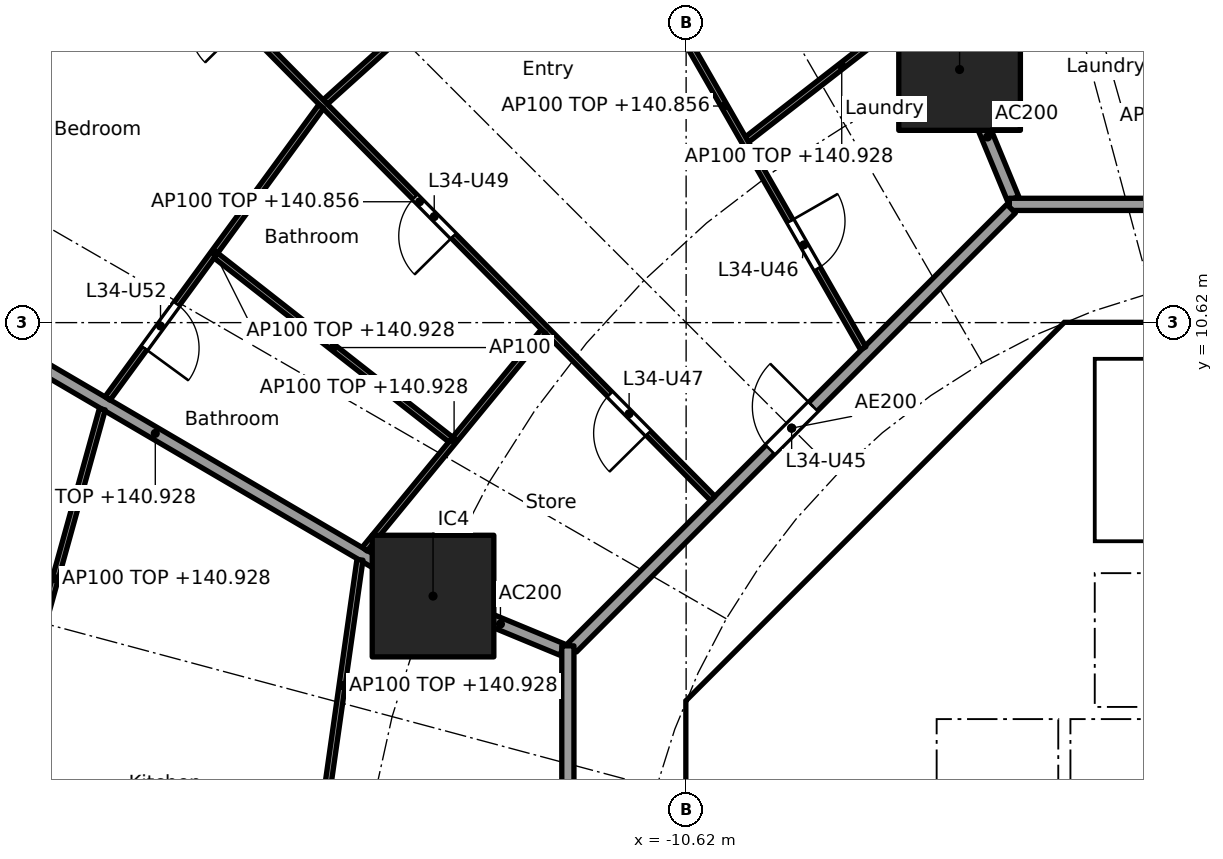
"""IFC4 building model, lengths in metres.
Left out: names, types, materials, properties, quantities, classifications, styles, units other than length and angle.
Written with IfcOpenShell. Run it as: python <this file> out.ifc"""

import sys

from ifc_helpers import new_model, si_unit, direction, frame, frame_2d, origin, origin_2d, place, context, subcontext, project, spatial, polyline, rectangle, outline, extrude, element, fill, save


model = new_model("IFC4")
c1 = context("Model", 3, precision=1e-05, world=origin(), true_north=direction((0.0, 1.0)))
c2 = subcontext(c1, "Body", "Model", "MODEL_VIEW")
j1 = project(units=[si_unit("LENGTHUNIT", "METRE"), si_unit("PLANEANGLEUNIT", "RADIAN")], contexts=[c1])
p1 = place(None, origin())
s1 = spatial("IfcSite", under=j1, at=p1, CompositionType="ELEMENT")
p2 = place(p1, origin())
s2 = spatial("IfcBuilding", under=s1, at=p2, CompositionType="ELEMENT")
p3 = place(p2, frame((0.0, 0.0, 138.1)))
s3 = spatial("IfcBuildingStorey", under=s2, at=p3, CompositionType="ELEMENT", Elevation=138.1)
for number, where, z_axis, x_axis in (
    (1, (-6.123, 14.782, 0.0), (0.0, 0.0, 1.0), (1.0, 0.0, 0.0)),
    (2, (-14.782, 6.123, 0.0), (0.0, 0.0, 1.0), (1.0, 0.0, 0.0)),
):
    element("IfcColumn", number, at=place(p3, frame(where, z_axis=z_axis, x_axis=x_axis)), inside=s3, PredefinedType="COLUMN", context=c2, shape_type="SweptSolid", body=[
        extrude(rectangle(XDim=2.0, YDim=2.0, at=origin_2d()), origin(), (0.0, 0.0, 1.0), 3.7),
    ])
p4 = place(p3, frame((-4.613, 9.988, 0.0), z_axis=(0.0, 0.0, 1.0), x_axis=(-0.707106781187, -0.707106781187, 0.0)))
e3 = element("IfcWall", 3, at=p4, inside=s3, PredefinedType="SHEAR", context=c2, shape_type="SweptSolid", body=[
    extrude(rectangle(XDim=7.602, YDim=0.6, at=frame_2d((3.801, 0.0))), origin(), (0.0, 0.0, 1.0), 3.44),
])
p5 = place(p4, frame((0.351, 0.0, 0.0)))
e4 = element("IfcOpeningElement", 4, at=p5, cuts=e3, PredefinedType="OPENING", context=c2, shape_type="SweptSolid", body=[
    extrude(rectangle(XDim=1.1, YDim=2.1, at=frame_2d((0.55, 1.05))), frame((0.0, 0.31, 0.0), z_axis=(0.0, -1.0, 0.0), x_axis=(1.0, 0.0, 0.0)), (0.0, 0.0, 1.0), 0.62),
])
p6 = place(p3, frame((-10.325, 3.801, 0.0), z_axis=(0.0, 0.0, 1.0), x_axis=(0.0, -1.0, 0.0)))
e5 = element("IfcWall", 5, at=p6, inside=s3, PredefinedType="SHEAR", context=c2, shape_type="SweptSolid", body=[
    extrude(rectangle(XDim=7.602, YDim=0.6, at=frame_2d((3.801, 0.0))), origin(), (0.0, 0.0, 1.0), 3.44),
])
p7 = place(p6, frame((0.651, 0.0, 0.0)))
e6 = element("IfcOpeningElement", 6, at=p7, cuts=e5, PredefinedType="OPENING", context=c2, shape_type="SweptSolid", body=[
    extrude(rectangle(XDim=1.5, YDim=2.1, at=frame_2d((0.75, 1.05))), frame((0.0, 0.31, 0.0), z_axis=(0.0, -1.0, 0.0), x_axis=(1.0, 0.0, 0.0)), (0.0, 0.0, 1.0), 0.62),
])
p8 = place(p6, frame((5.451, 0.0, 0.0)))
e7 = element("IfcOpeningElement", 7, at=p8, cuts=e5, PredefinedType="OPENING", context=c2, shape_type="SweptSolid", body=[
    extrude(rectangle(XDim=1.5, YDim=2.1, at=frame_2d((0.75, 1.05))), frame((0.0, 0.31, 0.0), z_axis=(0.0, -1.0, 0.0), x_axis=(1.0, 0.0, 0.0)), (0.0, 0.0, 1.0), 0.62),
])
p9 = place(p3, frame((-5.8, 4.3, 0.0), z_axis=(0.0, 0.0, 1.0), x_axis=(0.0, 1.0, 0.0)))
e8 = element("IfcWall", 8, at=p9, inside=s3, PredefinedType="PARTITIONING", context=c2, shape_type="SweptSolid", body=[
    extrude(rectangle(XDim=3.927, YDim=0.15, at=frame_2d((1.963, 0.0))), origin(), (0.0, 0.0, 1.0), 3.44),
])
p10 = place(p9, frame((0.413, 0.0, 0.0)))
e9 = element("IfcOpeningElement", 9, at=p10, cuts=e8, PredefinedType="OPENING", context=c2, shape_type="SweptSolid", body=[
    extrude(rectangle(XDim=0.9, YDim=2.1, at=frame_2d((0.45, 1.05))), frame((0.0, 0.085, 0.0), z_axis=(0.0, -1.0, 0.0), x_axis=(1.0, 0.0, 0.0)), (0.0, 0.0, 1.0), 0.17),
])
p11 = place(p9, frame((2.489, 0.0, 0.0)))
e10 = element("IfcOpeningElement", 10, at=p11, cuts=e8, PredefinedType="OPENING", context=c2, shape_type="SweptSolid", body=[
    extrude(rectangle(XDim=0.9, YDim=2.1, at=frame_2d((0.45, 1.05))), frame((0.0, 0.085, 0.0), z_axis=(0.0, -1.0, 0.0), x_axis=(1.0, 0.0, 0.0)), (0.0, 0.0, 1.0), 0.17),
])
p12 = place(p3, frame((-4.0, 4.3, 0.0), z_axis=(0.0, 0.0, 1.0), x_axis=(0.0, 1.0, 0.0)))
e11 = element("IfcWall", 11, at=p12, inside=s3, PredefinedType="SOLIDWALL", context=c2, shape_type="SweptSolid", body=[
    extrude(rectangle(XDim=2.2, YDim=0.2, at=frame_2d((1.1, 0.0))), origin(), (0.0, 0.0, 1.0), 3.44),
])
p13 = place(p12, frame((0.55, 0.0, 0.0)))
e12 = element("IfcOpeningElement", 12, at=p13, cuts=e11, PredefinedType="OPENING", context=c2, shape_type="SweptSolid", body=[
    extrude(rectangle(XDim=1.1, YDim=2.1, at=frame_2d((0.55, 1.05))), frame((0.0, 0.11, 0.0), z_axis=(0.0, -1.0, 0.0), x_axis=(1.0, 0.0, 0.0)), (0.0, 0.0, 1.0), 0.22),
])
p14 = place(p3, origin())
e13 = element("IfcWall", 13, at=p14, inside=s3, PredefinedType="SHEAR", context=c2, shape_type="SweptSolid", body=[
    extrude(outline(polyline([(-10.2, 4.825), (-9.776, 4.401), (-10.025, 4.152), (-10.025, 3.801), (-10.625, 3.801), (-10.625, 4.401), (-10.2, 4.825)])), origin(), (0.0, 0.0, 1.0), 3.44),
])
p15 = place(p3, origin())
e14 = element("IfcWall", 14, at=p15, inside=s3, PredefinedType="SHEAR", context=c2, shape_type="SweptSolid", body=[
    extrude(outline(polyline([(-4.152, 10.025), (-4.401, 9.776), (-4.825, 10.2), (-4.401, 10.625), (4.401, 10.625), (4.825, 10.2), (4.401, 9.776), (4.152, 10.025), (-4.152, 10.025)])), origin(), (0.0, 0.0, 1.0), 3.44),
])
p16 = place(p3, frame((-10.025, 4.0, 0.0), z_axis=(0.0, 0.0, 1.0), x_axis=(1.0, 0.0, 0.0)))
e15 = element("IfcWall", 15, at=p16, inside=s3, PredefinedType="PARTITIONING", context=c2, shape_type="SweptSolid", body=[
    extrude(rectangle(XDim=3.325, YDim=0.2, at=frame_2d((1.662, 0.0))), origin(), (0.0, 0.0, 1.0), 3.44),
])
p17 = place(p3, frame((-8.001, 6.1, 0.0), z_axis=(0.0, 0.0, 1.0), x_axis=(1.0, 0.0, 0.0)))
e16 = element("IfcWall", 16, at=p17, inside=s3, PredefinedType="PARTITIONING", context=c2, shape_type="SweptSolid", body=[
    extrude(rectangle(XDim=2.126, YDim=0.15, at=frame_2d((1.063, 0.0))), origin(), (0.0, 0.0, 1.0), 3.44),
])
p18 = place(p3, origin())
e17 = element("IfcWall", 17, at=p18, inside=s3, PredefinedType="SOLIDWALL", context=c2, shape_type="SweptSolid", body=[
    extrude(outline(polyline([(-6.5, 2.1), (-6.7, 2.1), (-6.7, 4.3), (6.7, 4.3), (6.7, 2.1), (6.5, 2.1), (6.5, 4.1), (4.5, 4.1), (4.5, 2.1), (4.3, 2.1), (4.3, 4.1), (2.3, 4.1), (2.3, 2.1), (2.1, 2.1), (2.1, 4.1), (0.1, 4.1), (0.1, 2.1), (-0.1, 2.1), (-0.1, 4.1), (-2.1, 4.1), (-2.1, 2.1), (-2.3, 2.1), (-2.3, 4.1), (-4.3, 4.1), (-4.3, 2.1), (-4.5, 2.1), (-4.5, 4.1), (-6.5, 4.1), (-6.5, 2.1)])), origin(), (0.0, 0.0, 1.0), 3.44),
])
p19 = place(p3, origin())
e18 = element("IfcWall", 18, at=p19, inside=s3, PredefinedType="SOLIDWALL", context=c2, shape_type="SweptSolid", body=[
    extrude(outline(polyline([(-3.9, 7.025), (-4.1, 7.025), (-4.1, 10.025), (-3.9, 10.025), (-3.9, 7.025)])), origin(), (0.0, 0.0, 1.0), 3.44),
])
p20 = place(p3, origin())
e19 = element("IfcWall", 19, at=p20, inside=s3, PredefinedType="SOLIDWALL", context=c2, shape_type="SweptSolid", body=[
    extrude(outline(polyline([(4.1, 6.5), (-4.1, 6.5), (-4.1, 7.025), (4.1, 7.025), (4.1, 6.5)])), origin(), (0.0, 0.0, 1.0), 3.44),
])
p21 = place(p3, frame((-5.243, 12.657, 0.0), z_axis=(0.0, 0.0, 1.0), x_axis=(-0.38273085373, 0.923859888513, 0.0)))
e20 = element("IfcWall", 20, at=p21, inside=s3, PredefinedType="PARTITIONING", context=c2, shape_type="SweptSolid", body=[
    extrude(rectangle(XDim=2.199, YDim=0.2, at=frame_2d((1.1, 0.0))), origin(), (0.0, 0.0, 1.0), 3.44),
])
p22 = place(p3, frame((-6.134, 14.831, 0.0), z_axis=(0.0, 0.0, 1.0), x_axis=(-0.220337590808, 0.975423675167, 0.0)))
e21 = element("IfcWall", 21, at=p22, inside=s3, PredefinedType="PARTITIONING", context=c2, shape_type="SweptSolid", body=[
    extrude(rectangle(XDim=10.451, YDim=0.2, at=frame_2d((5.226, 0.0))), origin(), (0.0, 0.0, 1.0), 2.828),
])
p23 = place(p3, frame((-12.657, 5.243, 0.0), z_axis=(0.0, 0.0, 1.0), x_axis=(-0.923869415315, 0.382707856524, 0.0)))
e22 = element("IfcWall", 22, at=p23, inside=s3, PredefinedType="PARTITIONING", context=c2, shape_type="SweptSolid", body=[
    extrude(rectangle(XDim=2.2, YDim=0.2, at=frame_2d((1.1, 0.0))), origin(), (0.0, 0.0, 1.0), 3.44),
])
p24 = place(p3, frame((-14.825, 6.148, 0.0), z_axis=(0.0, 0.0, 1.0), x_axis=(-0.862852031662, 0.505456597006, 0.0)))
e23 = element("IfcWall", 23, at=p24, inside=s3, PredefinedType="PARTITIONING", context=c2, shape_type="SweptSolid", body=[
    extrude(rectangle(XDim=10.487, YDim=0.2, at=frame_2d((5.244, 0.0))), origin(), (0.0, 0.0, 1.0), 2.828),
])
p25 = place(p3, frame((5.104, 12.565, 0.0), z_axis=(0.0, 0.0, 1.0), x_axis=(-1.0, 0.0, 0.0)))
e24 = element("IfcWall", 24, at=p25, inside=s3, PredefinedType="PARTITIONING", context=c2, shape_type="SweptSolid", body=[
    extrude(rectangle(XDim=10.409, YDim=0.2, at=frame_2d((5.205, 0.0))), origin(), (0.0, 0.0, 1.0), 3.44),
])
p26 = place(p3, frame((-5.275, 12.494, 0.0), z_axis=(0.0, 0.0, 1.0), x_axis=(-0.707106781187, -0.707106781187, 0.0)))
e25 = element("IfcWall", 25, at=p26, inside=s3, PredefinedType="PARTITIONING", context=c2, shape_type="SweptSolid", body=[
    extrude(rectangle(XDim=10.209, YDim=0.2, at=frame_2d((5.104, 0.0))), origin(), (0.0, 0.0, 1.0), 3.44),
])
p27 = place(p26, frame((4.604, 0.0, 0.0)))
e26 = element("IfcOpeningElement", 26, at=p27, cuts=e25, PredefinedType="OPENING", context=c2, shape_type="SweptSolid", body=[
    extrude(rectangle(XDim=1.0, YDim=2.1, at=frame_2d((0.5, 1.05))), frame((0.0, 0.11, 0.0), z_axis=(0.0, -1.0, 0.0), x_axis=(1.0, 0.0, 0.0)), (0.0, 0.0, 1.0), 0.22),
])
p28 = place(p3, frame((-12.565, 5.304, 0.0), z_axis=(0.0, 0.0, 1.0), x_axis=(0.0, -1.0, 0.0)))
e27 = element("IfcWall", 27, at=p28, inside=s3, PredefinedType="PARTITIONING", context=c2, shape_type="SweptSolid", body=[
    extrude(rectangle(XDim=10.409, YDim=0.2, at=frame_2d((5.205, 0.0))), origin(), (0.0, 0.0, 1.0), 3.44),
])
p29 = place(p3, frame((-6.503, 16.054, 0.0), z_axis=(0.0, 0.0, 1.0), x_axis=(-0.789428807693, -0.613842127574, 0.0)))
e28 = element("IfcWall", 28, at=p29, inside=s3, PredefinedType="PARTITIONING", context=c2, shape_type="SweptSolid", body=[
    extrude(rectangle(XDim=3.948, YDim=0.1, at=frame_2d((1.974, 0.0))), origin(), (0.0, 0.0, 1.0), 2.828),
])
p30 = place(p3, frame((-7.708, 10.198, 0.0), z_axis=(0.0, 0.0, 1.0), x_axis=(-0.497449462689, 0.867492957937, 0.0)))
e29 = element("IfcWall", 29, at=p30, inside=s3, PredefinedType="PARTITIONING", context=c2, shape_type="SweptSolid", body=[
    extrude(rectangle(XDim=9.185, YDim=0.1, at=frame_2d((4.592, 0.0))), origin(), (0.0, 0.0, 1.0), 2.756),
])
p31 = place(p30, frame((1.511, 0.0, 0.0)))
e30 = element("IfcOpeningElement", 30, at=p31, cuts=e29, PredefinedType="OPENING", context=c2, shape_type="SweptSolid", body=[
    extrude(rectangle(XDim=0.9, YDim=2.1, at=frame_2d((0.45, 1.05))), frame((0.0, 0.06, 0.0), z_axis=(0.0, -1.0, 0.0), x_axis=(1.0, 0.0, 0.0)), (0.0, 0.0, 1.0), 0.12),
])
p32 = place(p30, frame((6.078, 0.0, 0.0)))
e31 = element("IfcOpeningElement", 31, at=p32, cuts=e29, PredefinedType="OPENING", context=c2, shape_type="SweptSolid", body=[
    extrude(rectangle(XDim=0.9, YDim=2.1, at=frame_2d((0.45, 1.05))), frame((0.0, 0.06, 0.0), z_axis=(0.0, -1.0, 0.0), x_axis=(1.0, 0.0, 0.0)), (0.0, 0.0, 1.0), 0.12),
])
p33 = place(p3, frame((-12.289, 18.089, 0.0), z_axis=(0.0, 0.0, 1.0), x_axis=(-0.743146066164, -0.669129228435, 0.0)))
e32 = element("IfcWall", 32, at=p33, inside=s3, PredefinedType="PARTITIONING", context=c2, shape_type="SweptSolid", body=[
    extrude(rectangle(XDim=5.739, YDim=0.1, at=frame_2d((2.87, 0.0))), origin(), (0.0, 0.0, 1.0), 2.828),
])
p34 = place(p33, frame((2.42, 0.0, 0.0)))
e33 = element("IfcOpeningElement", 33, at=p34, cuts=e32, PredefinedType="OPENING", context=c2, shape_type="SweptSolid", body=[
    extrude(rectangle(XDim=0.9, YDim=2.1, at=frame_2d((0.45, 1.05))), frame((0.0, 0.06, 0.0), z_axis=(0.0, -1.0, 0.0), x_axis=(1.0, 0.0, 0.0)), (0.0, 0.0, 1.0), 0.12),
])
p35 = place(p3, frame((-10.182, 7.729, 0.0), z_axis=(0.0, 0.0, 1.0), x_axis=(-0.702930219229, 0.7112588185, 0.0)))
e34 = element("IfcWall", 34, at=p35, inside=s3, PredefinedType="PARTITIONING", context=c2, shape_type="SweptSolid", body=[
    extrude(rectangle(XDim=13.719, YDim=0.1, at=frame_2d((6.859, 0.0))), origin(), (0.0, 0.0, 1.0), 2.756),
])
p36 = place(p35, frame((1.507, 0.0, 0.0)))
e35 = element("IfcOpeningElement", 35, at=p36, cuts=e34, PredefinedType="OPENING", context=c2, shape_type="SweptSolid", body=[
    extrude(rectangle(XDim=0.9, YDim=2.1, at=frame_2d((0.45, 1.05))), frame((0.0, 0.06, 0.0), z_axis=(0.0, -1.0, 0.0), x_axis=(1.0, 0.0, 0.0)), (0.0, 0.0, 1.0), 0.12),
])
p37 = place(p35, frame((6.067, 0.0, 0.0)))
e36 = element("IfcOpeningElement", 36, at=p37, cuts=e34, PredefinedType="OPENING", context=c2, shape_type="SweptSolid", body=[
    extrude(rectangle(XDim=0.9, YDim=2.1, at=frame_2d((0.45, 1.05))), frame((0.0, 0.06, 0.0), z_axis=(0.0, -1.0, 0.0), x_axis=(1.0, 0.0, 0.0)), (0.0, 0.0, 1.0), 0.12),
])
p38 = place(p35, frame((10.969, 0.0, 0.0)))
e37 = element("IfcOpeningElement", 37, at=p38, cuts=e34, PredefinedType="OPENING", context=c2, shape_type="SweptSolid", body=[
    extrude(rectangle(XDim=0.9, YDim=2.1, at=frame_2d((0.45, 1.05))), frame((0.0, 0.06, 0.0), z_axis=(0.0, -1.0, 0.0), x_axis=(1.0, 0.0, 0.0)), (0.0, 0.0, 1.0), 0.12),
])
p39 = place(p3, frame((-12.965, 10.475, 0.0), z_axis=(0.0, 0.0, 1.0), x_axis=(-0.634943961338, -0.772558195841, 0.0)))
e38 = element("IfcWall", 38, at=p39, inside=s3, PredefinedType="PARTITIONING", context=c2, shape_type="SweptSolid", body=[
    extrude(rectangle(XDim=4.632, YDim=0.1, at=frame_2d((2.316, 0.0))), origin(), (0.0, 0.0, 1.0), 2.828),
])
p40 = place(p3, frame((-16.621, 14.174, 0.0), z_axis=(0.0, 0.0, 1.0), x_axis=(-0.590674917338, -0.806909624449, 0.0)))
e39 = element("IfcWall", 39, at=p40, inside=s3, PredefinedType="PARTITIONING", context=c2, shape_type="SweptSolid", body=[
    extrude(rectangle(XDim=5.949, YDim=0.1, at=frame_2d((2.975, 0.0))), origin(), (0.0, 0.0, 1.0), 2.828),
])
p41 = place(p40, frame((4.024, 0.0, 0.0)))
e40 = element("IfcOpeningElement", 40, at=p41, cuts=e39, PredefinedType="OPENING", context=c2, shape_type="SweptSolid", body=[
    extrude(rectangle(XDim=0.9, YDim=2.1, at=frame_2d((0.45, 1.05))), frame((0.0, 0.06, 0.0), z_axis=(0.0, -1.0, 0.0), x_axis=(1.0, 0.0, 0.0)), (0.0, 0.0, 1.0), 0.12),
])
p42 = place(p3, frame((-14.491, 8.697, 0.0), z_axis=(0.0, 0.0, 1.0), x_axis=(-0.787139479951, 0.616775031193, 0.0)))
e41 = element("IfcWall", 41, at=p42, inside=s3, PredefinedType="PARTITIONING", context=c2, shape_type="SweptSolid", body=[
    extrude(rectangle(XDim=4.907, YDim=0.1, at=frame_2d((2.453, 0.0))), origin(), (0.0, 0.0, 1.0), 3.44),
])
p43 = place(p3, frame((-15.984, 6.72, 0.0), z_axis=(0.0, 0.0, 1.0), x_axis=(-0.140684869512, -0.990054426529, 0.0)))
e42 = element("IfcWall", 42, at=p43, inside=s3, PredefinedType="PARTITIONING", context=c2, shape_type="SweptSolid", body=[
    extrude(rectangle(XDim=4.177, YDim=0.1, at=frame_2d((2.088, 0.0))), origin(), (0.0, 0.0, 1.0), 2.828),
])
p44 = place(p3, frame((-20.221, 9.197, 0.0), z_axis=(0.0, 0.0, 1.0), x_axis=(-0.267398009191, -0.963586168789, 0.0)))
e43 = element("IfcWall", 43, at=p44, inside=s3, PredefinedType="PARTITIONING", context=c2, shape_type="SweptSolid", body=[
    extrude(rectangle(XDim=5.788, YDim=0.1, at=frame_2d((2.894, 0.0))), origin(), (0.0, 0.0, 1.0), 2.828),
])
p45 = place(p13, origin())
e44 = element("IfcDoor", 44, at=p45, inside=s3, OperationType="DOUBLE_DOOR_SLIDING", PredefinedType="DOOR", context=c2, shape_type="SweptSolid", body=[
    extrude(rectangle(XDim=1.1, YDim=2.1, at=frame_2d((0.55, 1.05))), frame((0.0, 0.025, 0.0), z_axis=(0.0, -1.0, 0.0), x_axis=(1.0, 0.0, 0.0)), (0.0, 0.0, 1.0), 0.05),
])
fill(e12, e44)
p46 = place(p10, origin())
e45 = element("IfcDoor", 45, at=p46, inside=s3, OperationType="SINGLE_SWING_LEFT", PredefinedType="DOOR", context=c2, shape_type="SweptSolid", body=[
    extrude(rectangle(XDim=0.9, YDim=2.1, at=frame_2d((0.45, 1.05))), frame((0.0, 0.025, 0.0), z_axis=(0.0, -1.0, 0.0), x_axis=(1.0, 0.0, 0.0)), (0.0, 0.0, 1.0), 0.05),
])
fill(e9, e45)
p47 = place(p11, origin())
e46 = element("IfcDoor", 46, at=p47, inside=s3, OperationType="SINGLE_SWING_LEFT", PredefinedType="DOOR", context=c2, shape_type="SweptSolid", body=[
    extrude(rectangle(XDim=0.9, YDim=2.1, at=frame_2d((0.45, 1.05))), frame((0.0, 0.025, 0.0), z_axis=(0.0, -1.0, 0.0), x_axis=(1.0, 0.0, 0.0)), (0.0, 0.0, 1.0), 0.05),
])
fill(e10, e46)
p48 = place(p7, origin())
e47 = element("IfcDoor", 47, at=p48, inside=s3, OperationType="DOUBLE_DOOR_SINGLE_SWING", PredefinedType="DOOR", context=c2, shape_type="SweptSolid", body=[
    extrude(rectangle(XDim=1.5, YDim=2.1, at=frame_2d((0.75, 1.05))), frame((0.0, 0.025, 0.0), z_axis=(0.0, -1.0, 0.0), x_axis=(1.0, 0.0, 0.0)), (0.0, 0.0, 1.0), 0.05),
])
fill(e6, e47)
p49 = place(p5, origin())
e48 = element("IfcDoor", 48, at=p49, inside=s3, OperationType="SINGLE_SWING_RIGHT", PredefinedType="DOOR", context=c2, shape_type="SweptSolid", body=[
    extrude(rectangle(XDim=1.1, YDim=2.1, at=frame_2d((0.55, 1.05))), frame((0.0, 0.025, 0.0), z_axis=(0.0, -1.0, 0.0), x_axis=(1.0, 0.0, 0.0)), (0.0, 0.0, 1.0), 0.05),
])
fill(e4, e48)
p50 = place(p27, frame((1.0, 0.0, 0.0), x_axis=(-1.0, 0.0, 0.0)))
e49 = element("IfcDoor", 49, at=p50, inside=s3, OperationType="SINGLE_SWING_RIGHT", PredefinedType="DOOR", context=c2, shape_type="SweptSolid", body=[
    extrude(rectangle(XDim=1.0, YDim=2.1, at=frame_2d((0.5, 1.05))), frame((0.0, 0.025, 0.0), z_axis=(0.0, -1.0, 0.0), x_axis=(1.0, 0.0, 0.0)), (0.0, 0.0, 1.0), 0.05),
])
fill(e26, e49)
p51 = place(p31, frame((0.9, 0.0, 0.0), x_axis=(-1.0, 0.0, 0.0)))
e50 = element("IfcDoor", 50, at=p51, inside=s3, OperationType="SINGLE_SWING_LEFT", PredefinedType="DOOR", context=c2, shape_type="SweptSolid", body=[
    extrude(rectangle(XDim=0.9, YDim=2.1, at=frame_2d((0.45, 1.05))), frame((0.0, 0.025, 0.0), z_axis=(0.0, -1.0, 0.0), x_axis=(1.0, 0.0, 0.0)), (0.0, 0.0, 1.0), 0.05),
])
fill(e30, e50)
p52 = place(p36, origin())
e51 = element("IfcDoor", 51, at=p52, inside=s3, OperationType="SINGLE_SWING_LEFT", PredefinedType="DOOR", context=c2, shape_type="SweptSolid", body=[
    extrude(rectangle(XDim=0.9, YDim=2.1, at=frame_2d((0.45, 1.05))), frame((0.0, 0.025, 0.0), z_axis=(0.0, -1.0, 0.0), x_axis=(1.0, 0.0, 0.0)), (0.0, 0.0, 1.0), 0.05),
])
fill(e35, e51)
p53 = place(p37, origin())
e52 = element("IfcDoor", 52, at=p53, inside=s3, OperationType="SINGLE_SWING_LEFT", PredefinedType="DOOR", context=c2, shape_type="SweptSolid", body=[
    extrude(rectangle(XDim=0.9, YDim=2.1, at=frame_2d((0.45, 1.05))), frame((0.0, 0.025, 0.0), z_axis=(0.0, -1.0, 0.0), x_axis=(1.0, 0.0, 0.0)), (0.0, 0.0, 1.0), 0.05),
])
fill(e36, e52)
p54 = place(p41, origin())
e53 = element("IfcDoor", 53, at=p54, inside=s3, OperationType="SINGLE_SWING_RIGHT", PredefinedType="DOOR", context=c2, shape_type="SweptSolid", body=[
    extrude(rectangle(XDim=0.9, YDim=2.1, at=frame_2d((0.45, 1.05))), frame((0.0, 0.025, 0.0), z_axis=(0.0, -1.0, 0.0), x_axis=(1.0, 0.0, 0.0)), (0.0, 0.0, 1.0), 0.05),
])
fill(e40, e53)
save(model, sys.argv[1])
